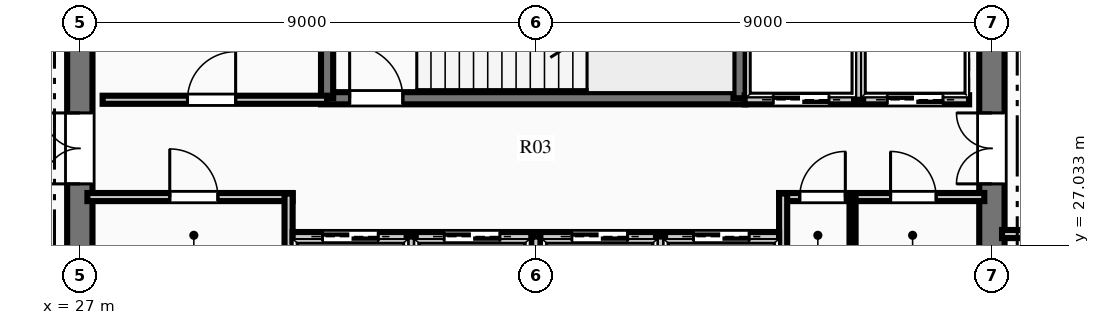
"""IFC4 building model, lengths in metres.
Left out: names, types, materials, properties, quantities, classifications, styles, units other than length and angle.
Written with IfcOpenShell. Run it as: python <this file> out.ifc"""

import sys

from ifc_helpers import new_model, si_unit, direction, frame, frame_2d, origin, place, context, subcontext, project, spatial, rectangle, extrude, element, fill, save


model = new_model("IFC4")
c1 = context("Model", 3, precision=1e-05, world=origin(), true_north=direction((0.0, 1.0)))
c2 = subcontext(c1, "Body", "Model", "MODEL_VIEW")
j1 = project(units=[si_unit("LENGTHUNIT", "METRE"), si_unit("PLANEANGLEUNIT", "RADIAN")], contexts=[c1])
p1 = place(None, origin())
s1 = spatial("IfcSite", under=j1, at=p1, CompositionType="ELEMENT")
p2 = place(p1, origin())
s2 = spatial("IfcBuilding", under=s1, at=p2, CompositionType="ELEMENT")
p3 = place(p2, frame((0.0, 0.0, 239.7)))
s3 = spatial("IfcBuildingStorey", under=s2, at=p3, CompositionType="ELEMENT", Elevation=239.7)
p4 = place(p3, frame((27.0, 18.25, 0.0), z_axis=(0.0, 0.0, 1.0), x_axis=(0.0, 1.0, 0.0)))
e1 = element("IfcWall", 1, at=p4, inside=s3, PredefinedType="SHEAR", context=c2, shape_type="SweptSolid", body=[
    extrude(rectangle(XDim=15.5, YDim=0.5, at=frame_2d((7.75, 0.0))), origin(), (0.0, 0.0, 1.0), 4.5),
])
p5 = place(p4, frame((9.99, 0.0, 0.0)))
e2 = element("IfcOpeningElement", 2, at=p5, cuts=e1, PredefinedType="OPENING", context=c2, shape_type="SweptSolid", body=[
    extrude(rectangle(XDim=1.4, YDim=2.2, at=frame_2d((0.7, 1.1))), frame((0.0, 0.26, 0.0), z_axis=(0.0, -1.0, 0.0), x_axis=(1.0, 0.0, 0.0)), (0.0, 0.0, 1.0), 0.52),
])
p6 = place(p3, frame((45.0, 18.25, 0.0), z_axis=(0.0, 0.0, 1.0), x_axis=(0.0, 1.0, 0.0)))
e3 = element("IfcWall", 3, at=p6, inside=s3, PredefinedType="SHEAR", context=c2, shape_type="SweptSolid", body=[
    extrude(rectangle(XDim=15.5, YDim=0.5, at=frame_2d((7.75, 0.0))), origin(), (0.0, 0.0, 1.0), 4.5),
])
p7 = place(p6, frame((9.99, 0.0, 0.0)))
e4 = element("IfcOpeningElement", 4, at=p7, cuts=e3, PredefinedType="OPENING", context=c2, shape_type="SweptSolid", body=[
    extrude(rectangle(XDim=1.4, YDim=2.2, at=frame_2d((0.7, 1.1))), frame((0.0, 0.26, 0.0), z_axis=(0.0, -1.0, 0.0), x_axis=(1.0, 0.0, 0.0)), (0.0, 0.0, 1.0), 0.52),
])
p8 = place(p3, frame((31.76, 29.93, 0.0), z_axis=(0.0, 0.0, 1.0), x_axis=(1.0, 0.0, 0.0)))
e5 = element("IfcWall", 5, at=p8, inside=s3, PredefinedType="SHEAR", context=c2, shape_type="SweptSolid", body=[
    extrude(rectangle(XDim=8.38, YDim=0.24, at=frame_2d((4.19, 0.0))), origin(), (0.0, 0.0, 1.0), 4.5),
])
p9 = place(p8, frame((0.565, 0.0, 0.0)))
e6 = element("IfcOpeningElement", 6, at=p9, cuts=e5, PredefinedType="OPENING", context=c2, shape_type="SweptSolid", body=[
    extrude(rectangle(XDim=1.05, YDim=2.15, at=frame_2d((0.525, 1.075))), frame((0.0, 0.13, 0.0), z_axis=(0.0, -1.0, 0.0), x_axis=(1.0, 0.0, 0.0)), (0.0, 0.0, 1.0), 0.26),
])
p10 = place(p3, frame((31.88, 29.93, 0.0), z_axis=(0.0, 0.0, 1.0), x_axis=(0.0, 1.0, 0.0)))
e7 = element("IfcWall", 7, at=p10, inside=s3, PredefinedType="SHEAR", context=c2, shape_type="SweptSolid", body=[
    extrude(rectangle(XDim=3.79, YDim=0.24, at=frame_2d((1.895, 0.0))), origin(), (0.0, 0.0, 1.0), 4.5),
])
p11 = place(p3, frame((40.02, 29.93, 0.0), z_axis=(0.0, 0.0, 1.0), x_axis=(0.0, 1.0, 0.0)))
e8 = element("IfcWall", 8, at=p11, inside=s3, PredefinedType="SHEAR", context=c2, shape_type="SweptSolid", body=[
    extrude(rectangle(XDim=3.85, YDim=0.24, at=frame_2d((1.925, 0.0))), origin(), (0.0, 0.0, 1.0), 4.5),
])
p12 = place(p3, frame((27.15, 27.98, 0.0), z_axis=(0.0, 0.0, 1.0), x_axis=(1.0, 0.0, 0.0)))
e9 = element("IfcWall", 9, at=p12, inside=s3, PredefinedType="PARTITIONING", context=c2, shape_type="SweptSolid", body=[
    extrude(rectangle(XDim=4.05, YDim=0.16, at=frame_2d((2.025, 0.0))), origin(), (0.0, 0.0, 1.0), 4.1),
])
p13 = place(p12, frame((1.625, 0.0, 0.0)))
e10 = element("IfcOpeningElement", 10, at=p13, cuts=e9, PredefinedType="OPENING", context=c2, shape_type="SweptSolid", body=[
    extrude(rectangle(XDim=0.95, YDim=2.15, at=frame_2d((0.475, 1.075))), frame((0.0, 0.09, 0.0), z_axis=(0.0, -1.0, 0.0), x_axis=(1.0, 0.0, 0.0)), (0.0, 0.0, 1.0), 0.18),
])
p14 = place(p3, frame((31.12, 26.54, 0.0), z_axis=(0.0, 0.0, 1.0), x_axis=(0.0, 1.0, 0.0)))
e11 = element("IfcWall", 11, at=p14, inside=s3, PredefinedType="PARTITIONING", context=c2, shape_type="SweptSolid", body=[
    extrude(rectangle(XDim=1.51, YDim=0.16, at=frame_2d((0.755, 0.0))), origin(), (0.0, 0.0, 1.0), 4.1),
])
p15 = place(p3, frame((40.8, 27.98, 0.0), z_axis=(0.0, 0.0, 1.0), x_axis=(1.0, 0.0, 0.0)))
e12 = element("IfcWall", 12, at=p15, inside=s3, PredefinedType="PARTITIONING", context=c2, shape_type="SweptSolid", body=[
    extrude(rectangle(XDim=4.05, YDim=0.16, at=frame_2d((2.025, 0.0))), origin(), (0.0, 0.0, 1.0), 4.1),
])
p16 = place(p15, frame((0.407, 0.0, 0.0)))
e13 = element("IfcOpeningElement", 13, at=p16, cuts=e12, PredefinedType="OPENING", context=c2, shape_type="SweptSolid", body=[
    extrude(rectangle(XDim=0.9, YDim=2.15, at=frame_2d((0.45, 1.075))), frame((0.0, 0.09, 0.0), z_axis=(0.0, -1.0, 0.0), x_axis=(1.0, 0.0, 0.0)), (0.0, 0.0, 1.0), 0.18),
])
p17 = place(p15, frame((2.2, 0.0, 0.0)))
e14 = element("IfcOpeningElement", 14, at=p17, cuts=e12, PredefinedType="OPENING", context=c2, shape_type="SweptSolid", body=[
    extrude(rectangle(XDim=0.9, YDim=2.15, at=frame_2d((0.45, 1.075))), frame((0.0, 0.09, 0.0), z_axis=(0.0, -1.0, 0.0), x_axis=(1.0, 0.0, 0.0)), (0.0, 0.0, 1.0), 0.18),
])
p18 = place(p3, frame((40.88, 26.54, 0.0), z_axis=(0.0, 0.0, 1.0), x_axis=(0.0, 1.0, 0.0)))
e15 = element("IfcWall", 15, at=p18, inside=s3, PredefinedType="PARTITIONING", context=c2, shape_type="SweptSolid", body=[
    extrude(rectangle(XDim=1.51, YDim=0.16, at=frame_2d((0.755, 0.0))), origin(), (0.0, 0.0, 1.0), 4.1),
])
p19 = place(p3, frame((42.25, 26.54, 0.0), z_axis=(0.0, 0.0, 1.0), x_axis=(0.0, 1.0, 0.0)))
e16 = element("IfcWall", 16, at=p19, inside=s3, PredefinedType="PARTITIONING", context=c2, shape_type="SweptSolid", body=[
    extrude(rectangle(XDim=1.44, YDim=0.12, at=frame_2d((0.72, 0.0))), origin(), (0.0, 0.0, 1.0), 4.1),
])
p20 = place(p3, frame((27.45, 29.9, 0.0), z_axis=(0.0, 0.0, 1.0), x_axis=(1.0, 0.0, 0.0)))
e17 = element("IfcWall", 17, at=p20, inside=s3, PredefinedType="PARTITIONING", context=c2, shape_type="SweptSolid", body=[
    extrude(rectangle(XDim=4.43, YDim=0.16, at=frame_2d((2.215, 0.0))), origin(), (0.0, 0.0, 1.0), 4.1),
])
p21 = place(p20, frame((1.675, 0.0, 0.0)))
e18 = element("IfcOpeningElement", 18, at=p21, cuts=e17, PredefinedType="OPENING", context=c2, shape_type="SweptSolid", body=[
    extrude(rectangle(XDim=0.95, YDim=2.15, at=frame_2d((0.475, 1.075))), frame((0.0, 0.09, 0.0), z_axis=(0.0, -1.0, 0.0), x_axis=(1.0, 0.0, 0.0)), (0.0, 0.0, 1.0), 0.18),
])
p22 = place(p3, frame((40.12, 29.9, 0.0), z_axis=(0.0, 0.0, 1.0), x_axis=(1.0, 0.0, 0.0)))
e19 = element("IfcWall", 19, at=p22, inside=s3, PredefinedType="PARTITIONING", context=c2, shape_type="SweptSolid", body=[
    extrude(rectangle(XDim=4.43, YDim=0.18, at=frame_2d((2.215, 0.0))), origin(), (0.0, 0.0, 1.0), 4.1),
])
p23 = place(p22, frame((0.565, 0.0, 0.0)))
e20 = element("IfcOpeningElement", 20, at=p23, cuts=e19, PredefinedType="OPENING", context=c2, shape_type="SweptSolid", body=[
    extrude(rectangle(XDim=1.1, YDim=2.15, at=frame_2d((0.55, 1.075))), frame((0.0, 0.1, 0.0), z_axis=(0.0, -1.0, 0.0), x_axis=(1.0, 0.0, 0.0)), (0.0, 0.0, 1.0), 0.2),
])
p24 = place(p22, frame((2.815, 0.0, 0.0)))
e21 = element("IfcOpeningElement", 21, at=p24, cuts=e19, PredefinedType="OPENING", context=c2, shape_type="SweptSolid", body=[
    extrude(rectangle(XDim=1.1, YDim=2.15, at=frame_2d((0.55, 1.075))), frame((0.0, 0.1, 0.0), z_axis=(0.0, -1.0, 0.0), x_axis=(1.0, 0.0, 0.0)), (0.0, 0.0, 1.0), 0.2),
])
p25 = place(p3, frame((42.37, 29.9, 0.0), z_axis=(0.0, 0.0, 1.0), x_axis=(0.0, 1.0, 0.0)))
e22 = element("IfcWall", 22, at=p25, inside=s3, PredefinedType="PARTITIONING", context=c2, shape_type="SweptSolid", body=[
    extrude(rectangle(XDim=3.75, YDim=0.18, at=frame_2d((1.875, 0.0))), origin(), (0.0, 0.0, 1.0), 4.1),
])
p26 = place(p3, frame((31.2, 27.2, 0.0), z_axis=(0.0, 0.0, 1.0), x_axis=(1.0, 0.0, 0.0)))
e23 = element("IfcWall", 23, at=p26, inside=s3, PredefinedType="PARTITIONING", context=c2, shape_type="SweptSolid", body=[
    extrude(rectangle(XDim=9.6, YDim=0.18, at=frame_2d((4.8, 0.0))), origin(), (0.0, 0.0, 1.0), 4.1),
])
p27 = place(p26, frame((0.59, 0.0, 0.0)))
e24 = element("IfcOpeningElement", 24, at=p27, cuts=e23, PredefinedType="OPENING", context=c2, shape_type="SweptSolid", body=[
    extrude(rectangle(XDim=1.1, YDim=2.15, at=frame_2d((0.55, 1.075))), frame((0.0, 0.1, 0.0), z_axis=(0.0, -1.0, 0.0), x_axis=(1.0, 0.0, 0.0)), (0.0, 0.0, 1.0), 0.2),
])
p28 = place(p26, frame((2.99, 0.0, 0.0)))
e25 = element("IfcOpeningElement", 25, at=p28, cuts=e23, PredefinedType="OPENING", context=c2, shape_type="SweptSolid", body=[
    extrude(rectangle(XDim=1.1, YDim=2.15, at=frame_2d((0.55, 1.075))), frame((0.0, 0.1, 0.0), z_axis=(0.0, -1.0, 0.0), x_axis=(1.0, 0.0, 0.0)), (0.0, 0.0, 1.0), 0.2),
])
p29 = place(p26, frame((5.51, 0.0, 0.0)))
e26 = element("IfcOpeningElement", 26, at=p29, cuts=e23, PredefinedType="OPENING", context=c2, shape_type="SweptSolid", body=[
    extrude(rectangle(XDim=1.1, YDim=2.15, at=frame_2d((0.55, 1.075))), frame((0.0, 0.1, 0.0), z_axis=(0.0, -1.0, 0.0), x_axis=(1.0, 0.0, 0.0)), (0.0, 0.0, 1.0), 0.2),
])
p30 = place(p26, frame((7.91, 0.0, 0.0)))
e27 = element("IfcOpeningElement", 27, at=p30, cuts=e23, PredefinedType="OPENING", context=c2, shape_type="SweptSolid", body=[
    extrude(rectangle(XDim=1.1, YDim=2.15, at=frame_2d((0.55, 1.075))), frame((0.0, 0.1, 0.0), z_axis=(0.0, -1.0, 0.0), x_axis=(1.0, 0.0, 0.0)), (0.0, 0.0, 1.0), 0.2),
])
for number, where, z_axis, x_axis in (
    (28, (33.54, 25.3, 0.0), (0.0, 0.0, 1.0), (0.0, 1.0, 0.0)),
    (29, (36.0, 25.3, 0.0), (0.0, 0.0, 1.0), (0.0, 1.0, 0.0)),
    (30, (38.46, 25.3, 0.0), (0.0, 0.0, 1.0), (0.0, 1.0, 0.0)),
):
    element("IfcWall", number, at=place(p3, frame(where, z_axis=z_axis, x_axis=x_axis)), inside=s3, PredefinedType="PARTITIONING", context=c2, shape_type="SweptSolid", body=[
        extrude(rectangle(XDim=1.9, YDim=0.18, at=frame_2d((0.95, 0.0))), origin(), (0.0, 0.0, 1.0), 4.1),
    ])
p31 = place(p3, frame((45.2, 27.25, 0.0), z_axis=(0.0, 0.0, 1.0), x_axis=(1.0, 0.0, 0.0)))
e31 = element("IfcWall", 31, at=p31, inside=s3, PredefinedType="PARTITIONING", context=c2, shape_type="SweptSolid", body=[
    extrude(rectangle(XDim=2.25, YDim=0.16, at=frame_2d((1.125, 0.0))), origin(), (0.0, 0.0, 1.0), 4.1),
])
p32 = place(p13, origin())
e32 = element("IfcDoor", 32, at=p32, inside=s3, OperationType="SINGLE_SWING_LEFT", PredefinedType="DOOR", context=c2, shape_type="SweptSolid", body=[
    extrude(rectangle(XDim=0.95, YDim=2.15, at=frame_2d((0.475, 1.075))), frame((0.0, 0.025, 0.0), z_axis=(0.0, -1.0, 0.0), x_axis=(1.0, 0.0, 0.0)), (0.0, 0.0, 1.0), 0.05),
])
fill(e10, e32)
p33 = place(p16, origin())
e33 = element("IfcDoor", 33, at=p33, inside=s3, OperationType="SINGLE_SWING_RIGHT", PredefinedType="DOOR", context=c2, shape_type="SweptSolid", body=[
    extrude(rectangle(XDim=0.9, YDim=2.15, at=frame_2d((0.45, 1.075))), frame((0.0, 0.025, 0.0), z_axis=(0.0, -1.0, 0.0), x_axis=(1.0, 0.0, 0.0)), (0.0, 0.0, 1.0), 0.05),
])
fill(e13, e33)
p34 = place(p17, origin())
e34 = element("IfcDoor", 34, at=p34, inside=s3, OperationType="SINGLE_SWING_LEFT", PredefinedType="DOOR", context=c2, shape_type="SweptSolid", body=[
    extrude(rectangle(XDim=0.9, YDim=2.15, at=frame_2d((0.45, 1.075))), frame((0.0, 0.025, 0.0), z_axis=(0.0, -1.0, 0.0), x_axis=(1.0, 0.0, 0.0)), (0.0, 0.0, 1.0), 0.05),
])
fill(e14, e34)
p35 = place(p21, origin())
e35 = element("IfcDoor", 35, at=p35, inside=s3, OperationType="SINGLE_SWING_RIGHT", PredefinedType="DOOR", context=c2, shape_type="SweptSolid", body=[
    extrude(rectangle(XDim=0.95, YDim=2.15, at=frame_2d((0.475, 1.075))), frame((0.0, 0.025, 0.0), z_axis=(0.0, -1.0, 0.0), x_axis=(1.0, 0.0, 0.0)), (0.0, 0.0, 1.0), 0.05),
])
fill(e18, e35)
p36 = place(p9, origin())
e36 = element("IfcDoor", 36, at=p36, inside=s3, OperationType="SINGLE_SWING_LEFT", PredefinedType="DOOR", context=c2, shape_type="SweptSolid", body=[
    extrude(rectangle(XDim=1.05, YDim=2.15, at=frame_2d((0.525, 1.075))), frame((0.0, 0.025, 0.0), z_axis=(0.0, -1.0, 0.0), x_axis=(1.0, 0.0, 0.0)), (0.0, 0.0, 1.0), 0.05),
])
fill(e6, e36)
p37 = place(p5, origin())
e37 = element("IfcDoor", 37, at=p37, inside=s3, OperationType="DOUBLE_DOOR_SINGLE_SWING", PredefinedType="DOOR", context=c2, shape_type="SweptSolid", body=[
    extrude(rectangle(XDim=1.4, YDim=2.2, at=frame_2d((0.7, 1.1))), frame((0.0, 0.025, 0.0), z_axis=(0.0, -1.0, 0.0), x_axis=(1.0, 0.0, 0.0)), (0.0, 0.0, 1.0), 0.05),
])
fill(e2, e37)
p38 = place(p7, origin())
e38 = element("IfcDoor", 38, at=p38, inside=s3, OperationType="DOUBLE_DOOR_SINGLE_SWING", PredefinedType="DOOR", context=c2, shape_type="SweptSolid", body=[
    extrude(rectangle(XDim=1.4, YDim=2.2, at=frame_2d((0.7, 1.1))), frame((0.0, 0.025, 0.0), z_axis=(0.0, -1.0, 0.0), x_axis=(1.0, 0.0, 0.0)), (0.0, 0.0, 1.0), 0.05),
])
fill(e4, e38)
p39 = place(p23, origin())
e39 = element("IfcDoor", 39, at=p39, inside=s3, OperationType="SLIDING_TO_LEFT", PredefinedType="DOOR", context=c2, shape_type="SweptSolid", body=[
    extrude(rectangle(XDim=1.1, YDim=2.15, at=frame_2d((0.55, 1.075))), frame((0.0, 0.025, 0.0), z_axis=(0.0, -1.0, 0.0), x_axis=(1.0, 0.0, 0.0)), (0.0, 0.0, 1.0), 0.05),
])
fill(e20, e39)
p40 = place(p24, origin())
e40 = element("IfcDoor", 40, at=p40, inside=s3, OperationType="SLIDING_TO_LEFT", PredefinedType="DOOR", context=c2, shape_type="SweptSolid", body=[
    extrude(rectangle(XDim=1.1, YDim=2.15, at=frame_2d((0.55, 1.075))), frame((0.0, 0.025, 0.0), z_axis=(0.0, -1.0, 0.0), x_axis=(1.0, 0.0, 0.0)), (0.0, 0.0, 1.0), 0.05),
])
fill(e21, e40)
p41 = place(p27, origin())
e41 = element("IfcDoor", 41, at=p41, inside=s3, OperationType="SLIDING_TO_LEFT", PredefinedType="DOOR", context=c2, shape_type="SweptSolid", body=[
    extrude(rectangle(XDim=1.1, YDim=2.15, at=frame_2d((0.55, 1.075))), frame((0.0, 0.025, 0.0), z_axis=(0.0, -1.0, 0.0), x_axis=(1.0, 0.0, 0.0)), (0.0, 0.0, 1.0), 0.05),
])
fill(e24, e41)
p42 = place(p28, origin())
e42 = element("IfcDoor", 42, at=p42, inside=s3, OperationType="SLIDING_TO_LEFT", PredefinedType="DOOR", context=c2, shape_type="SweptSolid", body=[
    extrude(rectangle(XDim=1.1, YDim=2.15, at=frame_2d((0.55, 1.075))), frame((0.0, 0.025, 0.0), z_axis=(0.0, -1.0, 0.0), x_axis=(1.0, 0.0, 0.0)), (0.0, 0.0, 1.0), 0.05),
])
fill(e25, e42)
p43 = place(p29, origin())
e43 = element("IfcDoor", 43, at=p43, inside=s3, OperationType="SLIDING_TO_LEFT", PredefinedType="DOOR", context=c2, shape_type="SweptSolid", body=[
    extrude(rectangle(XDim=1.1, YDim=2.15, at=frame_2d((0.55, 1.075))), frame((0.0, 0.025, 0.0), z_axis=(0.0, -1.0, 0.0), x_axis=(1.0, 0.0, 0.0)), (0.0, 0.0, 1.0), 0.05),
])
fill(e26, e43)
p44 = place(p30, origin())
e44 = element("IfcDoor", 44, at=p44, inside=s3, OperationType="SLIDING_TO_LEFT", PredefinedType="DOOR", context=c2, shape_type="SweptSolid", body=[
    extrude(rectangle(XDim=1.1, YDim=2.15, at=frame_2d((0.55, 1.075))), frame((0.0, 0.025, 0.0), z_axis=(0.0, -1.0, 0.0), x_axis=(1.0, 0.0, 0.0)), (0.0, 0.0, 1.0), 0.05),
])
fill(e27, e44)
save(model, sys.argv[1])
